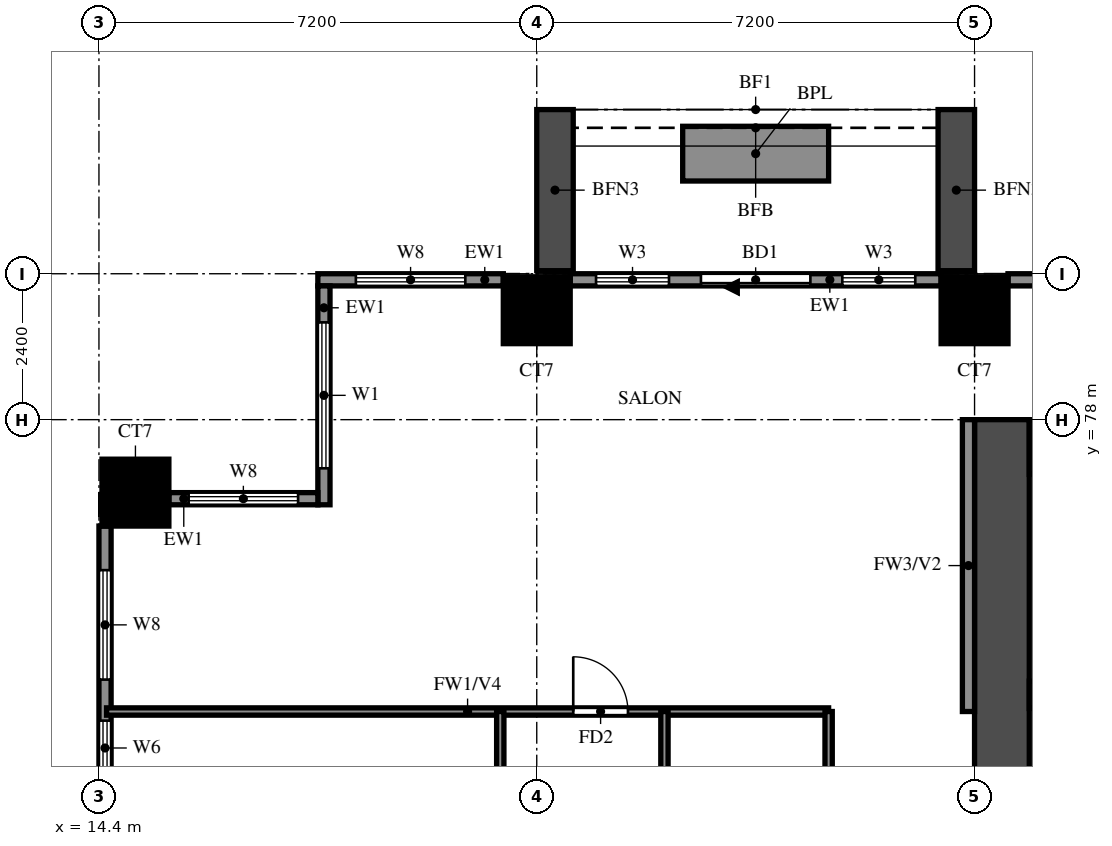
"""IFC4 building model, lengths in metres.
Left out: names, types, materials, properties, quantities, classifications, styles, units other than length and angle.
Written with IfcOpenShell. Run it as: python <this file> out.ifc"""

import sys

from ifc_helpers import new_model, si_unit, direction, frame, frame_2d, origin, origin_2d, place, context, subcontext, project, spatial, rectangle, extrude, source, transform, mapped, element, fill, save


model = new_model("IFC4")
c1 = context("Model", 3, precision=1e-05, world=origin(), true_north=direction((0.0, 1.0)))
c2 = subcontext(c1, "Body", "Model", "MODEL_VIEW")
j1 = project(units=[si_unit("LENGTHUNIT", "METRE"), si_unit("PLANEANGLEUNIT", "RADIAN")], contexts=[c1])
p1 = place(None, origin())
s1 = spatial("IfcSite", under=j1, at=p1, CompositionType="ELEMENT")
p2 = place(p1, origin())
s2 = spatial("IfcBuilding", under=s1, at=p2, CompositionType="ELEMENT")
p3 = place(p2, frame((0.0, 0.0, 55.0)))
s3 = spatial("IfcBuildingStorey", under=s2, at=p3, CompositionType="ELEMENT", Elevation=55.0)
m1 = source(origin(), c2, "Body", "SweptSolid", [
    extrude(rectangle(XDim=1.1, YDim=1.1, at=origin_2d()), origin(), (0.0, 0.0, 1.0), 3.18),
])
for number, where, z_axis, x_axis in (
    (1, (15.0, 76.8, 0.0), (0.0, 0.0, 1.0), (1.0, 0.0, 0.0)),
    (2, (21.6, 79.8, 0.0), (0.0, 0.0, 1.0), (1.0, 0.0, 0.0)),
    (3, (28.8, 79.8, 0.0), (0.0, 0.0, 1.0), (1.0, 0.0, 0.0)),
):
    element("IfcColumn", number, at=place(p3, frame(where, z_axis=z_axis, x_axis=x_axis)), inside=s3, PredefinedType="COLUMN", context=c2, shape_type="MappedRepresentation", body=[
        mapped(m1, transform((0.0, 0.0, 0.0))),
    ])
p4 = place(p3, frame((29.25, 66.0, 0.0), z_axis=(0.0, 0.0, 1.0), x_axis=(0.0, 1.0, 0.0)))
e4 = element("IfcWall", 4, at=p4, inside=s3, PredefinedType="SHEAR", context=c2, shape_type="SweptSolid", body=[
    extrude(rectangle(XDim=12.0, YDim=0.9, at=frame_2d((6.0, 0.0))), origin(), (0.0, 0.0, 1.0), 3.18),
])
p5 = place(p3, frame((29.7, 77.55, 0.0), z_axis=(0.0, 0.0, 1.0), x_axis=(1.0, 0.0, 0.0)))
e5 = element("IfcWall", 5, at=p5, inside=s3, PredefinedType="SHEAR", context=c2, shape_type="SweptSolid", body=[
    extrude(rectangle(XDim=41.4, YDim=0.9, at=frame_2d((20.7, 0.0))), origin(), (0.0, 0.0, 1.0), 3.18),
])
p6 = place(p3, frame((29.7, 73.475, 0.0), z_axis=(0.0, 0.0, 1.0), x_axis=(1.0, 0.0, 0.0)))
e6 = element("IfcWall", 6, at=p6, inside=s3, PredefinedType="SHEAR", context=c2, shape_type="SweptSolid", body=[
    extrude(rectangle(XDim=3.175, YDim=0.45, at=frame_2d((1.587, 0.0))), origin(), (0.0, 0.0, 1.0), 3.18),
])
p7 = place(p3, frame((35.45, 80.3, 0.0), z_axis=(0.0, 0.0, 1.0), x_axis=(-1.0, 0.0, 0.0)))
e7 = element("IfcWall", 7, at=p7, inside=s3, PredefinedType="SOLIDWALL", context=c2, shape_type="SweptSolid", body=[
    extrude(rectangle(XDim=6.1, YDim=0.2, at=frame_2d((3.05, 0.0))), origin(), (0.0, 0.0, 1.0), 3.18),
])
p8 = place(p3, frame((28.25, 80.3, 0.0), z_axis=(0.0, 0.0, 1.0), x_axis=(-1.0, 0.0, 0.0)))
e8 = element("IfcWall", 8, at=p8, inside=s3, PredefinedType="SOLIDWALL", context=c2, shape_type="SweptSolid", body=[
    extrude(rectangle(XDim=6.1, YDim=0.2, at=frame_2d((3.05, 0.0))), origin(), (0.0, 0.0, 1.0), 3.18),
])
p9 = place(p8, frame((2.15, 0.0, 0.0)))
e9 = element("IfcOpeningElement", 9, at=p9, cuts=e8, PredefinedType="OPENING", context=c2, shape_type="SweptSolid", body=[
    extrude(rectangle(XDim=1.8, YDim=2.4, at=frame_2d((0.9, 1.2))), frame((0.0, 0.11, 0.0), z_axis=(0.0, -1.0, 0.0), x_axis=(1.0, 0.0, 0.0)), (0.0, 0.0, 1.0), 0.22),
])
p10 = place(p8, frame((0.425, 0.0, 0.6)))
e10 = element("IfcOpeningElement", 10, at=p10, cuts=e8, PredefinedType="OPENING", context=c2, shape_type="SweptSolid", body=[
    extrude(rectangle(XDim=1.2, YDim=2.4, at=frame_2d((0.6, 1.2))), frame((0.0, 0.11, 0.0), z_axis=(0.0, -1.0, 0.0), x_axis=(1.0, 0.0, 0.0)), (0.0, 0.0, 1.0), 0.22),
])
p11 = place(p8, frame((4.475, 0.0, 0.6)))
e11 = element("IfcOpeningElement", 11, at=p11, cuts=e8, PredefinedType="OPENING", context=c2, shape_type="SweptSolid", body=[
    extrude(rectangle(XDim=1.2, YDim=2.4, at=frame_2d((0.6, 1.2))), frame((0.0, 0.11, 0.0), z_axis=(0.0, -1.0, 0.0), x_axis=(1.0, 0.0, 0.0)), (0.0, 0.0, 1.0), 0.22),
])
p12 = place(p3, frame((21.05, 80.3, 0.0), z_axis=(0.0, 0.0, 1.0), x_axis=(-1.0, 0.0, 0.0)))
e12 = element("IfcWall", 12, at=p12, inside=s3, PredefinedType="SOLIDWALL", context=c2, shape_type="SweptSolid", body=[
    extrude(rectangle(XDim=3.05, YDim=0.2, at=frame_2d((1.525, 0.0))), origin(), (0.0, 0.0, 1.0), 3.18),
])
p13 = place(p12, frame((0.625, 0.0, 0.6)))
e13 = element("IfcOpeningElement", 13, at=p13, cuts=e12, PredefinedType="OPENING", context=c2, shape_type="SweptSolid", body=[
    extrude(rectangle(XDim=1.8, YDim=2.4, at=frame_2d((0.9, 1.2))), frame((0.0, 0.11, 0.0), z_axis=(0.0, -1.0, 0.0), x_axis=(1.0, 0.0, 0.0)), (0.0, 0.0, 1.0), 0.22),
])
p14 = place(p3, frame((18.1, 80.2, 0.0), z_axis=(0.0, 0.0, 1.0), x_axis=(0.0, -1.0, 0.0)))
e14 = element("IfcWall", 14, at=p14, inside=s3, PredefinedType="SOLIDWALL", context=c2, shape_type="SweptSolid", body=[
    extrude(rectangle(XDim=3.6, YDim=0.2, at=frame_2d((1.8, 0.0))), origin(), (0.0, 0.0, 1.0), 3.18),
])
p15 = place(p14, frame((0.6, 0.0, 0.6)))
e15 = element("IfcOpeningElement", 15, at=p15, cuts=e14, PredefinedType="OPENING", context=c2, shape_type="SweptSolid", body=[
    extrude(rectangle(XDim=2.4, YDim=2.4, at=frame_2d((1.2, 1.2))), frame((0.0, 0.11, 0.0), z_axis=(0.0, -1.0, 0.0), x_axis=(1.0, 0.0, 0.0)), (0.0, 0.0, 1.0), 0.22),
])
p16 = place(p3, frame((18.0, 76.7, 0.0), z_axis=(0.0, 0.0, 1.0), x_axis=(-1.0, 0.0, 0.0)))
e16 = element("IfcWall", 16, at=p16, inside=s3, PredefinedType="SOLIDWALL", context=c2, shape_type="SweptSolid", body=[
    extrude(rectangle(XDim=2.45, YDim=0.2, at=frame_2d((1.225, 0.0))), origin(), (0.0, 0.0, 1.0), 3.18),
])
p17 = place(p16, frame((0.325, 0.0, 0.6)))
e17 = element("IfcOpeningElement", 17, at=p17, cuts=e16, PredefinedType="OPENING", context=c2, shape_type="SweptSolid", body=[
    extrude(rectangle(XDim=1.8, YDim=2.4, at=frame_2d((0.9, 1.2))), frame((0.0, 0.11, 0.0), z_axis=(0.0, -1.0, 0.0), x_axis=(1.0, 0.0, 0.0)), (0.0, 0.0, 1.0), 0.22),
])
p18 = place(p3, frame((14.5, 76.25, 0.0), z_axis=(0.0, 0.0, 1.0), x_axis=(0.0, -1.0, 0.0)))
e18 = element("IfcWall", 18, at=p18, inside=s3, PredefinedType="SOLIDWALL", context=c2, shape_type="SweptSolid", body=[
    extrude(rectangle(XDim=6.1, YDim=0.2, at=frame_2d((3.05, 0.0))), origin(), (0.0, 0.0, 1.0), 3.18),
])
p19 = place(p18, frame((3.2, 0.0, 1.5)))
e19 = element("IfcOpeningElement", 19, at=p19, cuts=e18, PredefinedType="OPENING", context=c2, shape_type="SweptSolid", body=[
    extrude(rectangle(XDim=0.9, YDim=0.9, at=frame_2d((0.45, 0.45))), frame((0.0, 0.11, 0.0), z_axis=(0.0, -1.0, 0.0), x_axis=(1.0, 0.0, 0.0)), (0.0, 0.0, 1.0), 0.22),
])
p20 = place(p18, frame((0.725, 0.0, 0.6)))
e20 = element("IfcOpeningElement", 20, at=p20, cuts=e18, PredefinedType="OPENING", context=c2, shape_type="SweptSolid", body=[
    extrude(rectangle(XDim=1.8, YDim=2.4, at=frame_2d((0.9, 1.2))), frame((0.0, 0.11, 0.0), z_axis=(0.0, -1.0, 0.0), x_axis=(1.0, 0.0, 0.0)), (0.0, 0.0, 1.0), 0.22),
])
for number, where, z_axis, x_axis in (
    (21, (28.5, 80.45, 0.0), (0.0, 0.0, 1.0), (0.0, 1.0, 0.0)),
    (22, (21.9, 80.45, 0.0), (0.0, 0.0, 1.0), (0.0, 1.0, 0.0)),
):
    element("IfcWall", number, at=place(p3, frame(where, z_axis=z_axis, x_axis=x_axis)), inside=s3, PredefinedType="SOLIDWALL", context=c2, shape_type="SweptSolid", body=[
        extrude(rectangle(XDim=2.65, YDim=0.6, at=frame_2d((1.325, 0.0))), origin(), (0.0, 0.0, 1.0), 2.85),
    ])
p21 = place(p3, frame((26.4, 82.375, 0.0), z_axis=(0.0, 0.0, 1.0), x_axis=(-1.0, 0.0, 0.0)))
e23 = element("IfcWall", 23, at=p21, inside=s3, PredefinedType="SOLIDWALL", context=c2, shape_type="SweptSolid", body=[
    extrude(rectangle(XDim=2.4, YDim=0.9, at=frame_2d((1.2, 0.0))), origin(), (0.0, 0.0, 1.0), 0.9),
])
p22 = place(p3, frame((28.7, 73.2, 0.0), z_axis=(0.0, 0.0, 1.0), x_axis=(0.0, 1.0, 0.0)))
e24 = element("IfcWall", 24, at=p22, inside=s3, PredefinedType="SOLIDWALL", context=c2, shape_type="SweptSolid", body=[
    extrude(rectangle(XDim=4.8, YDim=0.2, at=frame_2d((2.4, 0.0))), origin(), (0.0, 0.0, 1.0), 3.18),
])
p23 = place(p3, frame((14.525, 73.2, 0.0), z_axis=(0.0, 0.0, 1.0), x_axis=(1.0, 0.0, 0.0)))
e25 = element("IfcWall", 25, at=p23, inside=s3, PredefinedType="PARTITIONING", context=c2, shape_type="SweptSolid", body=[
    extrude(rectangle(XDim=11.875, YDim=0.12, at=frame_2d((5.938, 0.0))), origin(), (0.0, 0.0, 1.0), 2.28),
])
p24 = place(p23, frame((7.675, 0.0, 0.0)))
e26 = element("IfcOpeningElement", 26, at=p24, cuts=e25, PredefinedType="OPENING", context=c2, shape_type="SweptSolid", body=[
    extrude(rectangle(XDim=0.9, YDim=2.1, at=frame_2d((0.45, 1.05))), frame((0.0, 0.07, 0.0), z_axis=(0.0, -1.0, 0.0), x_axis=(1.0, 0.0, 0.0)), (0.0, 0.0, 1.0), 0.14),
])
p25 = place(p3, frame((21.0, 69.6, 0.0), z_axis=(0.0, 0.0, 1.0), x_axis=(0.0, 1.0, 0.0)))
e27 = element("IfcWall", 27, at=p25, inside=s3, PredefinedType="PARTITIONING", context=c2, shape_type="SweptSolid", body=[
    extrude(rectangle(XDim=3.6, YDim=0.12, at=frame_2d((1.8, 0.0))), origin(), (0.0, 0.0, 1.0), 3.18),
])
p26 = place(p3, frame((23.7, 61.2, 0.0), z_axis=(0.0, 0.0, 1.0), x_axis=(0.0, 1.0, 0.0)))
e28 = element("IfcWall", 28, at=p26, inside=s3, PredefinedType="PARTITIONING", context=c2, shape_type="SweptSolid", body=[
    extrude(rectangle(XDim=12.0, YDim=0.12, at=frame_2d((6.0, 0.0))), origin(), (0.0, 0.0, 1.0), 3.18),
])
p27 = place(p26, frame((4.55, 0.0, 0.0)))
e29 = element("IfcOpeningElement", 29, at=p27, cuts=e28, PredefinedType="OPENING", context=c2, shape_type="SweptSolid", body=[
    extrude(rectangle(XDim=0.9, YDim=2.1, at=frame_2d((0.45, 1.05))), frame((0.0, 0.07, 0.0), z_axis=(0.0, -1.0, 0.0), x_axis=(1.0, 0.0, 0.0)), (0.0, 0.0, 1.0), 0.14),
])
p28 = place(p26, frame((9.3, 0.0, 0.0)))
e30 = element("IfcOpeningElement", 30, at=p28, cuts=e28, PredefinedType="OPENING", context=c2, shape_type="SweptSolid", body=[
    extrude(rectangle(XDim=0.8, YDim=2.1, at=frame_2d((0.4, 1.05))), frame((0.0, 0.07, 0.0), z_axis=(0.0, -1.0, 0.0), x_axis=(1.0, 0.0, 0.0)), (0.0, 0.0, 1.0), 0.14),
])
p29 = place(p3, frame((26.4, 68.6, 0.0), z_axis=(0.0, 0.0, 1.0), x_axis=(0.0, 1.0, 0.0)))
e31 = element("IfcWall", 31, at=p29, inside=s3, PredefinedType="PARTITIONING", context=c2, shape_type="SweptSolid", body=[
    extrude(rectangle(XDim=4.6, YDim=0.12, at=frame_2d((2.3, 0.0))), origin(), (0.0, 0.0, 1.0), 3.18),
])
p30 = place(p9, origin())
e32 = element("IfcDoor", 32, at=p30, inside=s3, OperationType="DOUBLE_DOOR_SLIDING", PredefinedType="DOOR", context=c2, shape_type="SweptSolid", body=[
    extrude(rectangle(XDim=1.8, YDim=2.4, at=frame_2d((0.9, 1.2))), frame((0.0, 0.025, 0.0), z_axis=(0.0, -1.0, 0.0), x_axis=(1.0, 0.0, 0.0)), (0.0, 0.0, 1.0), 0.05),
])
fill(e9, e32)
p31 = place(p10, origin())
e33 = element("IfcWindow", 33, at=p31, inside=s3, PartitioningType="SINGLE_PANEL", PredefinedType="WINDOW", context=c2, shape_type="SweptSolid", body=[
    extrude(rectangle(XDim=1.2, YDim=2.4, at=frame_2d((0.6, 1.2))), frame((0.0, 0.03, 0.0), z_axis=(0.0, -1.0, 0.0), x_axis=(1.0, 0.0, 0.0)), (0.0, 0.0, 1.0), 0.06),
])
fill(e10, e33)
p32 = place(p11, origin())
e34 = element("IfcWindow", 34, at=p32, inside=s3, PartitioningType="SINGLE_PANEL", PredefinedType="WINDOW", context=c2, shape_type="SweptSolid", body=[
    extrude(rectangle(XDim=1.2, YDim=2.4, at=frame_2d((0.6, 1.2))), frame((0.0, 0.03, 0.0), z_axis=(0.0, -1.0, 0.0), x_axis=(1.0, 0.0, 0.0)), (0.0, 0.0, 1.0), 0.06),
])
fill(e11, e34)
p33 = place(p13, origin())
e35 = element("IfcWindow", 35, at=p33, inside=s3, PartitioningType="DOUBLE_PANEL_VERTICAL", PredefinedType="WINDOW", context=c2, shape_type="SweptSolid", body=[
    extrude(rectangle(XDim=1.8, YDim=2.4, at=frame_2d((0.9, 1.2))), frame((0.0, 0.03, 0.0), z_axis=(0.0, -1.0, 0.0), x_axis=(1.0, 0.0, 0.0)), (0.0, 0.0, 1.0), 0.06),
])
fill(e13, e35)
p34 = place(p15, origin())
e36 = element("IfcWindow", 36, at=p34, inside=s3, PartitioningType="DOUBLE_PANEL_VERTICAL", PredefinedType="WINDOW", context=c2, shape_type="SweptSolid", body=[
    extrude(rectangle(XDim=2.4, YDim=2.4, at=frame_2d((1.2, 1.2))), frame((0.0, 0.03, 0.0), z_axis=(0.0, -1.0, 0.0), x_axis=(1.0, 0.0, 0.0)), (0.0, 0.0, 1.0), 0.06),
])
fill(e15, e36)
p35 = place(p17, origin())
e37 = element("IfcWindow", 37, at=p35, inside=s3, PartitioningType="DOUBLE_PANEL_VERTICAL", PredefinedType="WINDOW", context=c2, shape_type="SweptSolid", body=[
    extrude(rectangle(XDim=1.8, YDim=2.4, at=frame_2d((0.9, 1.2))), frame((0.0, 0.03, 0.0), z_axis=(0.0, -1.0, 0.0), x_axis=(1.0, 0.0, 0.0)), (0.0, 0.0, 1.0), 0.06),
])
fill(e17, e37)
p36 = place(p19, origin())
e38 = element("IfcWindow", 38, at=p36, inside=s3, PartitioningType="SINGLE_PANEL", PredefinedType="WINDOW", context=c2, shape_type="SweptSolid", body=[
    extrude(rectangle(XDim=0.9, YDim=0.9, at=frame_2d((0.45, 0.45))), frame((0.0, 0.03, 0.0), z_axis=(0.0, -1.0, 0.0), x_axis=(1.0, 0.0, 0.0)), (0.0, 0.0, 1.0), 0.06),
])
fill(e19, e38)
p37 = place(p20, origin())
e39 = element("IfcWindow", 39, at=p37, inside=s3, PartitioningType="DOUBLE_PANEL_VERTICAL", PredefinedType="WINDOW", context=c2, shape_type="SweptSolid", body=[
    extrude(rectangle(XDim=1.8, YDim=2.4, at=frame_2d((0.9, 1.2))), frame((0.0, 0.03, 0.0), z_axis=(0.0, -1.0, 0.0), x_axis=(1.0, 0.0, 0.0)), (0.0, 0.0, 1.0), 0.06),
])
fill(e20, e39)
p38 = place(p24, origin())
e40 = element("IfcDoor", 40, at=p38, inside=s3, OperationType="SINGLE_SWING_LEFT", PredefinedType="DOOR", context=c2, shape_type="SweptSolid", body=[
    extrude(rectangle(XDim=0.9, YDim=2.1, at=frame_2d((0.45, 1.05))), frame((0.0, 0.025, 0.0), z_axis=(0.0, -1.0, 0.0), x_axis=(1.0, 0.0, 0.0)), (0.0, 0.0, 1.0), 0.05),
])
fill(e26, e40)
save(model, sys.argv[1])
